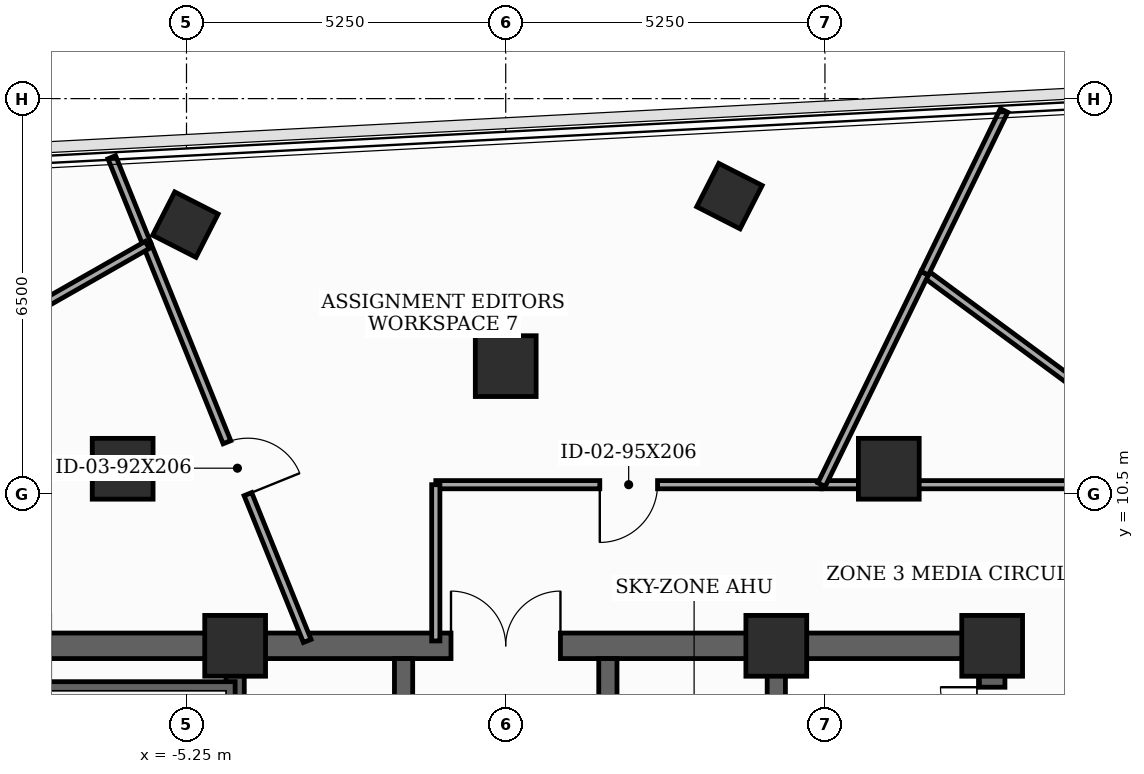
"""IFC4 building model, lengths in metres.
Left out: names, types, materials, properties, quantities, classifications, styles, units other than length and angle.
Written with IfcOpenShell. Run it as: python <this file> out.ifc"""

import sys

from ifc_helpers import new_model, si_unit, direction, frame, frame_2d, origin, origin_2d, place, context, subcontext, project, spatial, rectangle, extrude, element, fill, save


model = new_model("IFC4")
c1 = context("Model", 3, precision=1e-05, world=origin(), true_north=direction((0.0, 1.0)))
c2 = subcontext(c1, "Body", "Model", "MODEL_VIEW")
j1 = project(units=[si_unit("LENGTHUNIT", "METRE"), si_unit("PLANEANGLEUNIT", "RADIAN")], contexts=[c1])
p1 = place(None, origin())
s1 = spatial("IfcSite", under=j1, at=p1, CompositionType="ELEMENT")
p2 = place(p1, origin())
s2 = spatial("IfcBuilding", under=s1, at=p2, CompositionType="ELEMENT")
p3 = place(p2, frame((0.0, 0.0, 267.0)))
s3 = spatial("IfcBuildingStorey", under=s2, at=p3, CompositionType="ELEMENT", Elevation=267.0)
for number, where, z_axis, x_axis in (
    (1, (8.0, 8.0, 0.0), (0.0, 0.0, 1.0), (1.0, 0.0, 0.0)),
    (2, (4.45, 8.0, 0.0), (0.0, 0.0, 1.0), (1.0, 0.0, 0.0)),
    (3, (-4.45, 8.0, 0.0), (0.0, 0.0, 1.0), (1.0, 0.0, 0.0)),
    (4, (6.3, 10.912, 0.0), (0.0, 0.0, 1.0), (1.0, 0.0, 0.0)),
    (5, (0.0, 12.6, 0.0), (0.0, 0.0, 1.0), (1.0, 0.0, 0.0)),
    (6, (-6.3, 10.912, 0.0), (0.0, 0.0, 1.0), (1.0, 0.0, 0.0)),
):
    element("IfcColumn", number, at=place(p3, frame(where, z_axis=z_axis, x_axis=x_axis)), inside=s3, PredefinedType="COLUMN", context=c2, shape_type="SweptSolid", body=[
        extrude(rectangle(XDim=1.0, YDim=1.0, at=origin_2d()), origin(), (0.0, 0.0, 1.0), 3.7),
    ])
for number, where, z_axis, x_axis in (
    (7, (3.679, 15.396, 0.0), (0.0, 0.0, 1.0), (0.454, 0.891, 0.0)),
    (8, (-5.269, 14.927, 0.0), (0.0, 0.0, 1.0), (0.454, 0.891, 0.0)),
):
    element("IfcColumn", number, at=place(p3, frame(where, z_axis=z_axis, x_axis=x_axis)), inside=s3, PredefinedType="COLUMN", context=c2, shape_type="SweptSolid", body=[
        extrude(rectangle(XDim=0.8, YDim=0.8, at=origin_2d()), origin(), (0.0, 0.0, 1.0), 3.7),
    ])
p4 = place(p3, frame((8.0, -8.0, 0.0), z_axis=(0.0, 0.0, 1.0), x_axis=(0.0, 1.0, 0.0)))
e9 = element("IfcWall", 9, at=p4, inside=s3, PredefinedType="SHEAR", context=c2, shape_type="SweptSolid", body=[
    extrude(rectangle(XDim=16.0, YDim=0.42, at=frame_2d((8.0, 0.0))), origin(), (0.0, 0.0, 1.0), 3.5),
])
p5 = place(p4, frame((9.6, 0.0, 0.0)))
e10 = element("IfcOpeningElement", 10, at=p5, cuts=e9, PredefinedType="OPENING", context=c2, shape_type="SweptSolid", body=[
    extrude(rectangle(XDim=1.05, YDim=2.15, at=frame_2d((0.525, 1.075))), frame((0.0, 0.22, 0.0), z_axis=(0.0, -1.0, 0.0), x_axis=(1.0, 0.0, 0.0)), (0.0, 0.0, 1.0), 0.44),
])
p6 = place(p4, frame((14.469, 0.0, 0.0)))
e11 = element("IfcOpeningElement", 11, at=p6, cuts=e9, PredefinedType="OPENING", context=c2, shape_type="SweptSolid", body=[
    extrude(rectangle(XDim=0.85, YDim=2.02, at=frame_2d((0.425, 1.01))), frame((0.0, 0.22, 0.0), z_axis=(0.0, -1.0, 0.0), x_axis=(1.0, 0.0, 0.0)), (0.0, 0.0, 1.0), 0.44),
])
p7 = place(p3, frame((-8.0, 8.0, 0.0), z_axis=(0.0, 0.0, 1.0), x_axis=(1.0, 0.0, 0.0)))
e12 = element("IfcWall", 12, at=p7, inside=s3, PredefinedType="SHEAR", context=c2, shape_type="SweptSolid", body=[
    extrude(rectangle(XDim=16.0, YDim=0.42, at=frame_2d((8.0, 0.0))), origin(), (0.0, 0.0, 1.0), 3.5),
])
p8 = place(p7, frame((7.1, 0.0, 0.0)))
e13 = element("IfcOpeningElement", 13, at=p8, cuts=e12, PredefinedType="OPENING", context=c2, shape_type="SweptSolid", body=[
    extrude(rectangle(XDim=1.8, YDim=2.15, at=frame_2d((0.9, 1.075))), frame((0.0, 0.22, 0.0), z_axis=(0.0, -1.0, 0.0), x_axis=(1.0, 0.0, 0.0)), (0.0, 0.0, 1.0), 0.44),
])
for number, where, z_axis, x_axis in (
    (14, (-4.45, -7.79, 0.0), (0.0, 0.0, 1.0), (0.0, 1.0, 0.0)),
    (15, (4.45, -7.79, 0.0), (0.0, 0.0, 1.0), (0.0, 1.0, 0.0)),
):
    element("IfcWall", number, at=place(p3, frame(where, z_axis=z_axis, x_axis=x_axis)), inside=s3, PredefinedType="SHEAR", context=c2, shape_type="SweptSolid", body=[
        extrude(rectangle(XDim=15.58, YDim=0.3, at=frame_2d((7.79, 0.0))), origin(), (0.0, 0.0, 1.0), 3.5),
    ])
p9 = place(p3, frame((-7.79, 7.26, 0.0), z_axis=(0.0, 0.0, 1.0), x_axis=(1.0, 0.0, 0.0)))
e16 = element("IfcWall", 16, at=p9, inside=s3, PredefinedType="SHEAR", context=c2, shape_type="SweptSolid", body=[
    extrude(rectangle(XDim=3.34, YDim=0.3, at=frame_2d((1.67, 0.0))), origin(), (0.0, 0.0, 1.0), 3.5),
])
p10 = place(p3, frame((-1.68, -4.85, 0.0), z_axis=(0.0, 0.0, 1.0), x_axis=(0.0, 1.0, 0.0)))
e17 = element("IfcWall", 17, at=p10, inside=s3, PredefinedType="SHEAR", context=c2, shape_type="SweptSolid", body=[
    extrude(rectangle(XDim=12.64, YDim=0.3, at=frame_2d((6.32, 0.0))), origin(), (0.0, 0.0, 1.0), 3.5),
])
p11 = place(p10, frame((3.5, 0.0, 0.0)))
e18 = element("IfcOpeningElement", 18, at=p11, cuts=e17, PredefinedType="OPENING", context=c2, shape_type="SweptSolid", body=[
    extrude(rectangle(XDim=0.95, YDim=2.1, at=frame_2d((0.475, 1.05))), frame((0.0, 0.16, 0.0), z_axis=(0.0, -1.0, 0.0), x_axis=(1.0, 0.0, 0.0)), (0.0, 0.0, 1.0), 0.32),
])
p12 = place(p10, frame((9.8, 0.0, 0.0)))
e19 = element("IfcOpeningElement", 19, at=p12, cuts=e17, PredefinedType="OPENING", context=c2, shape_type="SweptSolid", body=[
    extrude(rectangle(XDim=0.95, YDim=2.1, at=frame_2d((0.475, 1.05))), frame((0.0, 0.16, 0.0), z_axis=(0.0, -1.0, 0.0), x_axis=(1.0, 0.0, 0.0)), (0.0, 0.0, 1.0), 0.32),
])
p13 = place(p3, frame((1.68, -4.85, 0.0), z_axis=(0.0, 0.0, 1.0), x_axis=(0.0, 1.0, 0.0)))
e20 = element("IfcWall", 20, at=p13, inside=s3, PredefinedType="SHEAR", context=c2, shape_type="SweptSolid", body=[
    extrude(rectangle(XDim=12.64, YDim=0.3, at=frame_2d((6.32, 0.0))), origin(), (0.0, 0.0, 1.0), 3.5),
])
p14 = place(p13, frame((0.55, 0.0, 0.0)))
e21 = element("IfcOpeningElement", 21, at=p14, cuts=e20, PredefinedType="OPENING", context=c2, shape_type="SweptSolid", body=[
    extrude(rectangle(XDim=1.1, YDim=2.1, at=frame_2d((0.55, 1.05))), frame((0.0, 0.16, 0.0), z_axis=(0.0, -1.0, 0.0), x_axis=(1.0, 0.0, 0.0)), (0.0, 0.0, 1.0), 0.32),
])
p15 = place(p13, frame((2.65, 0.0, 0.0)))
e22 = element("IfcOpeningElement", 22, at=p15, cuts=e20, PredefinedType="OPENING", context=c2, shape_type="SweptSolid", body=[
    extrude(rectangle(XDim=1.1, YDim=2.1, at=frame_2d((0.55, 1.05))), frame((0.0, 0.16, 0.0), z_axis=(0.0, -1.0, 0.0), x_axis=(1.0, 0.0, 0.0)), (0.0, 0.0, 1.0), 0.32),
])
p16 = place(p13, frame((4.75, 0.0, 0.0)))
e23 = element("IfcOpeningElement", 23, at=p16, cuts=e20, PredefinedType="OPENING", context=c2, shape_type="SweptSolid", body=[
    extrude(rectangle(XDim=1.1, YDim=2.1, at=frame_2d((0.55, 1.05))), frame((0.0, 0.16, 0.0), z_axis=(0.0, -1.0, 0.0), x_axis=(1.0, 0.0, 0.0)), (0.0, 0.0, 1.0), 0.32),
])
p17 = place(p13, frame((8.9, 0.0, 0.0)))
e24 = element("IfcOpeningElement", 24, at=p17, cuts=e20, PredefinedType="OPENING", context=c2, shape_type="SweptSolid", body=[
    extrude(rectangle(XDim=0.95, YDim=2.1, at=frame_2d((0.475, 1.05))), frame((0.0, 0.16, 0.0), z_axis=(0.0, -1.0, 0.0), x_axis=(1.0, 0.0, 0.0)), (0.0, 0.0, 1.0), 0.32),
])
p18 = place(p3, frame((10.15, 10.65, 0.0), z_axis=(0.0, 0.0, 1.0), x_axis=(-1.0, 0.0, 0.0)))
e25 = element("IfcWall", 25, at=p18, inside=s3, PredefinedType="PARTITIONING", context=c2, shape_type="SweptSolid", body=[
    extrude(rectangle(XDim=4.956, YDim=0.135, at=frame_2d((2.478, 0.0))), origin(), (0.0, 0.0, 1.0), 2.085),
])
p19 = place(p3, frame((5.194, 10.65, 0.0), z_axis=(0.0, 0.0, 1.0), x_axis=(-1.0, 0.0, 0.0)))
e26 = element("IfcWall", 26, at=p19, inside=s3, PredefinedType="PARTITIONING", context=c2, shape_type="SweptSolid", body=[
    extrude(rectangle(XDim=6.344, YDim=0.135, at=frame_2d((3.172, 0.0))), origin(), (0.0, 0.0, 1.0), 2.085),
])
p20 = place(p19, frame((2.697, 0.0, 0.0)))
e27 = element("IfcOpeningElement", 27, at=p20, cuts=e26, PredefinedType="OPENING", context=c2, shape_type="SweptSolid", body=[
    extrude(rectangle(XDim=0.95, YDim=2.035, at=frame_2d((0.475, 1.018))), frame((0.0, 0.077, 0.0), z_axis=(0.0, -1.0, 0.0), x_axis=(1.0, 0.0, 0.0)), (0.0, 0.0, 1.0), 0.155),
])
p21 = place(p3, frame((-1.15, 10.65, 0.0), z_axis=(0.0, 0.0, 1.0), x_axis=(0.0, -1.0, 0.0)))
e28 = element("IfcWall", 28, at=p21, inside=s3, PredefinedType="PARTITIONING", context=c2, shape_type="SweptSolid", body=[
    extrude(rectangle(XDim=2.57, YDim=0.135, at=frame_2d((1.285, 0.0))), origin(), (0.0, 0.0, 1.0), 2.085),
])
p22 = place(p3, frame((11.788, 10.521, 0.0), z_axis=(0.0, 0.0, 1.0), x_axis=(-0.805162772786, 0.593053883993, 0.0)))
e29 = element("IfcWall", 29, at=p22, inside=s3, PredefinedType="PARTITIONING", context=c2, shape_type="SweptSolid", body=[
    extrude(rectangle(XDim=6.082, YDim=0.135, at=frame_2d((3.041, 0.0))), origin(), (0.0, 0.0, 1.0), 3.035),
])
p23 = place(p3, frame((6.891, 14.128, 0.0), z_axis=(0.0, 0.0, 1.0), x_axis=(-0.438511877771, -0.898725393573, 0.0)))
e30 = element("IfcWall", 30, at=p23, inside=s3, PredefinedType="PARTITIONING", context=c2, shape_type="SweptSolid", body=[
    extrude(rectangle(XDim=3.87, YDim=0.135, at=frame_2d((1.935, 0.0))), origin(), (0.0, 0.0, 1.0), 2.075),
])
p24 = place(p3, frame((8.196, 16.805, 0.0), z_axis=(0.0, 0.0, 1.0), x_axis=(-0.438139314435, -0.898907081486, 0.0)))
e31 = element("IfcWall", 31, at=p24, inside=s3, PredefinedType="PARTITIONING", context=c2, shape_type="SweptSolid", body=[
    extrude(rectangle(XDim=2.978, YDim=0.135, at=frame_2d((1.489, 0.0))), origin(), (0.0, 0.0, 1.0), 3.025),
])
p25 = place(p3, frame((-5.896, 14.593, 0.0), z_axis=(0.0, 0.0, 1.0), x_axis=(0.374630268076, -0.927174289032, 0.0)))
e32 = element("IfcWall", 32, at=p25, inside=s3, PredefinedType="PARTITIONING", context=c2, shape_type="SweptSolid", body=[
    extrude(rectangle(XDim=7.024, YDim=0.135, at=frame_2d((3.512, 0.0))), origin(), (0.0, 0.0, 1.0), 2.085),
])
p26 = place(p25, frame((3.5, 0.0, 0.0)))
e33 = element("IfcOpeningElement", 33, at=p26, cuts=e32, PredefinedType="OPENING", context=c2, shape_type="SweptSolid", body=[
    extrude(rectangle(XDim=0.92, YDim=2.035, at=frame_2d((0.46, 1.018))), frame((0.0, 0.077, 0.0), z_axis=(0.0, -1.0, 0.0), x_axis=(1.0, 0.0, 0.0)), (0.0, 0.0, 1.0), 0.155),
])
p27 = place(p3, frame((-6.479, 16.035, 0.0), z_axis=(0.0, 0.0, 1.0), x_axis=(0.374743256905, -0.927128627217, 0.0)))
e34 = element("IfcWall", 34, at=p27, inside=s3, PredefinedType="PARTITIONING", context=c2, shape_type="SweptSolid", body=[
    extrude(rectangle(XDim=1.556, YDim=0.135, at=frame_2d((0.778, 0.0))), origin(), (0.0, 0.0, 1.0), 3.025),
])
p28 = place(p3, frame((-5.896, 14.593, 0.0), z_axis=(0.0, 0.0, 1.0), x_axis=(-0.868954887981, -0.494891303877, 0.0)))
e35 = element("IfcWall", 35, at=p28, inside=s3, PredefinedType="PARTITIONING", context=c2, shape_type="SweptSolid", body=[
    extrude(rectangle(XDim=4.617, YDim=0.135, at=frame_2d((2.309, 0.0))), origin(), (0.0, 0.0, 1.0), 3.035),
])
p29 = place(p6, origin())
e36 = element("IfcDoor", 36, at=p29, inside=s3, OperationType="SINGLE_SWING_RIGHT", PredefinedType="TRAPDOOR", context=c2, shape_type="SweptSolid", body=[
    extrude(rectangle(XDim=0.85, YDim=2.02, at=frame_2d((0.425, 1.01))), frame((0.0, 0.025, 0.0), z_axis=(0.0, -1.0, 0.0), x_axis=(1.0, 0.0, 0.0)), (0.0, 0.0, 1.0), 0.05),
])
fill(e11, e36)
p30 = place(p8, origin())
e37 = element("IfcDoor", 37, at=p30, inside=s3, OperationType="DOUBLE_DOOR_SINGLE_SWING", PredefinedType="DOOR", context=c2, shape_type="SweptSolid", body=[
    extrude(rectangle(XDim=1.8, YDim=2.15, at=frame_2d((0.9, 1.075))), frame((0.0, 0.025, 0.0), z_axis=(0.0, -1.0, 0.0), x_axis=(1.0, 0.0, 0.0)), (0.0, 0.0, 1.0), 0.05),
])
fill(e13, e37)
p31 = place(p20, origin())
e38 = element("IfcDoor", 38, at=p31, inside=s3, OperationType="SINGLE_SWING_RIGHT", PredefinedType="DOOR", context=c2, shape_type="SweptSolid", body=[
    extrude(rectangle(XDim=0.95, YDim=2.035, at=frame_2d((0.475, 1.018))), frame((0.0, 0.025, 0.0), z_axis=(0.0, -1.0, 0.0), x_axis=(1.0, 0.0, 0.0)), (0.0, 0.0, 1.0), 0.05),
])
fill(e27, e38)
p32 = place(p26, origin())
e39 = element("IfcDoor", 39, at=p32, inside=s3, OperationType="SINGLE_SWING_RIGHT", PredefinedType="DOOR", context=c2, shape_type="SweptSolid", body=[
    extrude(rectangle(XDim=0.92, YDim=2.035, at=frame_2d((0.46, 1.018))), frame((0.0, 0.025, 0.0), z_axis=(0.0, -1.0, 0.0), x_axis=(1.0, 0.0, 0.0)), (0.0, 0.0, 1.0), 0.05),
])
fill(e33, e39)
save(model, sys.argv[1])
